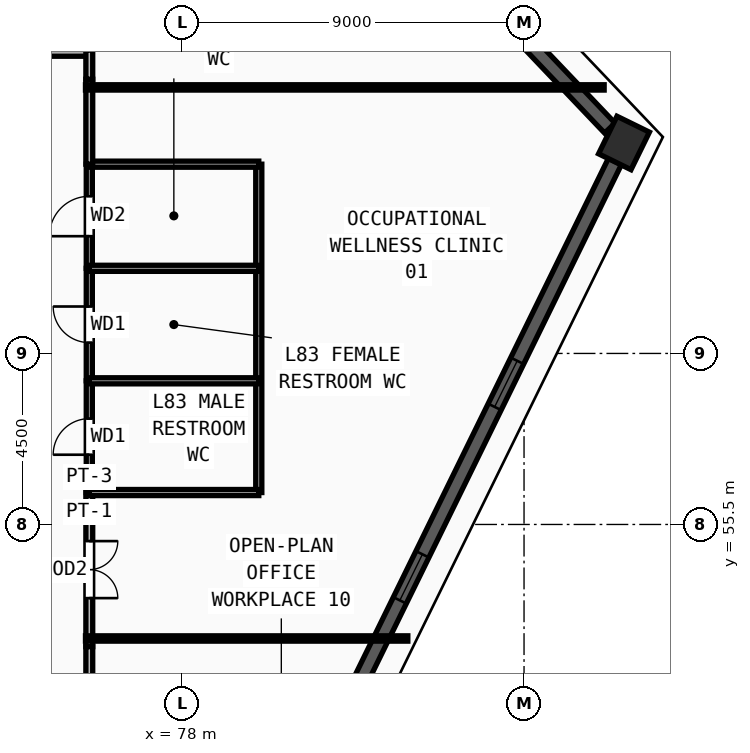
"""IFC4 building model, lengths in metres.
Left out: names, types, materials, properties, quantities, classifications, styles, units other than length and angle.
Written with IfcOpenShell. Run it as: python <this file> out.ifc"""

import sys

from ifc_helpers import new_model, si_unit, direction, frame, frame_2d, origin, origin_2d, place, context, subcontext, project, spatial, rectangle, extrude, source, transform, mapped, element, fill, save


model = new_model("IFC4")
c1 = context("Model", 3, precision=1e-05, world=origin(), true_north=direction((0.0, 1.0)))
c2 = subcontext(c1, "Body", "Model", "MODEL_VIEW")
j1 = project(units=[si_unit("LENGTHUNIT", "METRE"), si_unit("PLANEANGLEUNIT", "RADIAN")], contexts=[c1])
p1 = place(None, origin())
s1 = spatial("IfcSite", under=j1, at=p1, CompositionType="ELEMENT")
p2 = place(p1, origin())
s2 = spatial("IfcBuilding", under=s1, at=p2, CompositionType="ELEMENT")
p3 = place(p2, frame((0.0, 0.0, 320.25)))
s3 = spatial("IfcBuildingStorey", under=s2, at=p3, CompositionType="ELEMENT", Elevation=320.25)
m1 = source(origin(), c2, "Body", "SweptSolid", [
    extrude(rectangle(XDim=1.1, YDim=0.95, at=origin_2d()), origin(), (0.0, 0.0, 1.0), 3.75),
])
p4 = place(p3, frame((89.63, 65.538, 0.0), z_axis=(0.0, 0.0, 1.0), x_axis=(0.440095898534, 0.897950778213, 0.0)))
e1 = element("IfcColumn", 1, at=p4, inside=s3, PredefinedType="COLUMN", context=c2, shape_type="MappedRepresentation", body=[
    mapped(m1, transform((0.0, 0.0, 0.0), x_axis=(1.0, 0.0, 0.0), y_axis=(0.0, 1.0, 0.0), z_axis=(0.0, 0.0, 1.0), scale=1.0)),
])
p5 = place(p3, frame((77.918, 41.639, 0.0), z_axis=(0.0, 0.0, 1.0), x_axis=(0.440053301327, 0.897971654336, 0.0)))
e2 = element("IfcWall", 2, at=p5, inside=s3, PredefinedType="SOLIDWALL", context=c2, shape_type="SweptSolid", body=[
    extrude(rectangle(XDim=26.074, YDim=0.38, at=frame_2d((13.037, 0.0))), origin(), (0.0, 0.0, 1.0), 3.47),
])
m2 = source(origin(), c2, "Body", "SweptSolid", [
    extrude(rectangle(XDim=1.35, YDim=1.85, at=frame_2d((0.675, 0.925))), frame((0.0, 0.2, 0.0), z_axis=(0.0, -1.0, 0.0), x_axis=(1.0, 0.0, 0.0)), (0.0, 0.0, 1.0), 0.4),
])
p6 = place(p5, frame((13.212, 0.0, 0.55)))
e3 = element("IfcOpeningElement", 3, at=p6, cuts=e2, PredefinedType="OPENING", context=c2, shape_type="MappedRepresentation", body=[
    mapped(m2, transform((0.0, 0.0, 0.0), x_axis=(1.0, 0.0, 0.0), y_axis=(0.0, 1.0, 0.0), z_axis=(0.0, 0.0, 1.0), scale=1.0)),
])
p7 = place(p5, frame((18.881, 0.0, 0.55)))
e4 = element("IfcOpeningElement", 4, at=p7, cuts=e2, PredefinedType="OPENING", context=c2, shape_type="MappedRepresentation", body=[
    mapped(m2, transform((0.0, 0.0, 0.0), x_axis=(1.0, 0.0, 0.0), y_axis=(0.0, 1.0, 0.0), z_axis=(0.0, 0.0, 1.0), scale=1.0)),
])
p8 = place(p3, frame((89.258, 65.929, 0.0), z_axis=(0.0, 0.0, 1.0), x_axis=(-0.689374007366, 0.724405603215, 0.0)))
e5 = element("IfcWall", 5, at=p8, inside=s3, PredefinedType="SOLIDWALL", context=c2, shape_type="SweptSolid", body=[
    extrude(rectangle(XDim=3.882, YDim=0.38, at=frame_2d((1.941, 0.0))), origin(), (0.0, 0.0, 1.0), 3.47),
])
p9 = place(p3, frame((75.56, 56.34, 0.0), z_axis=(0.0, 0.0, 1.0), x_axis=(0.0, 1.0, 0.0)))
e6 = element("IfcWall", 6, at=p9, inside=s3, PredefinedType="PARTITIONING", context=c2, shape_type="SweptSolid", body=[
    extrude(rectangle(XDim=2.94, YDim=0.16, at=frame_2d((1.47, 0.0))), origin(), (0.0, 0.0, 1.0), 3.47),
])
m3 = source(origin(), c2, "Body", "SweptSolid", [
    extrude(rectangle(XDim=0.95, YDim=2.15, at=frame_2d((0.475, 1.075))), frame((0.0, 0.09, 0.0), z_axis=(0.0, -1.0, 0.0), x_axis=(1.0, 0.0, 0.0)), (0.0, 0.0, 1.0), 0.18),
])
p10 = place(p9, frame((0.995, 0.0, 0.0)))
e7 = element("IfcOpeningElement", 7, at=p10, cuts=e6, PredefinedType="OPENING", context=c2, shape_type="MappedRepresentation", body=[
    mapped(m3, transform((0.0, 0.0, 0.0), x_axis=(1.0, 0.0, 0.0), y_axis=(0.0, 1.0, 0.0), z_axis=(0.0, 0.0, 1.0), scale=1.0)),
])
p11 = place(p3, frame((75.56, 59.28, 0.0), z_axis=(0.0, 0.0, 1.0), x_axis=(0.0, 1.0, 0.0)))
e8 = element("IfcWall", 8, at=p11, inside=s3, PredefinedType="PARTITIONING", context=c2, shape_type="SweptSolid", body=[
    extrude(rectangle(XDim=2.96, YDim=0.16, at=frame_2d((1.48, 0.0))), origin(), (0.0, 0.0, 1.0), 3.47),
])
p12 = place(p11, frame((1.005, 0.0, 0.0)))
e9 = element("IfcOpeningElement", 9, at=p12, cuts=e8, PredefinedType="OPENING", context=c2, shape_type="MappedRepresentation", body=[
    mapped(m3, transform((0.0, 0.0, 0.0), x_axis=(1.0, 0.0, 0.0), y_axis=(0.0, 1.0, 0.0), z_axis=(0.0, 0.0, 1.0), scale=1.0)),
])
p13 = place(p3, frame((75.56, 62.24, 0.0), z_axis=(0.0, 0.0, 1.0), x_axis=(0.0, 1.0, 0.0)))
e10 = element("IfcWall", 10, at=p13, inside=s3, PredefinedType="PARTITIONING", context=c2, shape_type="SweptSolid", body=[
    extrude(rectangle(XDim=2.74, YDim=0.16, at=frame_2d((1.37, 0.0))), origin(), (0.0, 0.0, 1.0), 3.47),
])
m4 = source(origin(), c2, "Body", "SweptSolid", [
    extrude(rectangle(XDim=1.05, YDim=2.15, at=frame_2d((0.525, 1.075))), frame((0.0, 0.09, 0.0), z_axis=(0.0, -1.0, 0.0), x_axis=(1.0, 0.0, 0.0)), (0.0, 0.0, 1.0), 0.18),
])
p14 = place(p13, frame((0.845, 0.0, 0.0)))
e11 = element("IfcOpeningElement", 11, at=p14, cuts=e10, PredefinedType="OPENING", context=c2, shape_type="MappedRepresentation", body=[
    mapped(m4, transform((0.0, 0.0, 0.0), x_axis=(1.0, 0.0, 0.0), y_axis=(0.0, 1.0, 0.0), z_axis=(0.0, 0.0, 1.0), scale=1.0)),
])
p15 = place(p3, frame((75.56, 56.34, 0.0), z_axis=(0.0, 0.0, 1.0), x_axis=(0.0, -1.0, 0.0)))
e12 = element("IfcWall", 12, at=p15, inside=s3, PredefinedType="PARTITIONING", context=c2, shape_type="SweptSolid", body=[
    extrude(rectangle(XDim=4.055, YDim=0.18, at=frame_2d((2.028, 0.0))), origin(), (0.0, 0.0, 1.0), 3.47),
])
m5 = source(origin(), c2, "Body", "SweptSolid", [
    extrude(rectangle(XDim=1.5, YDim=2.2, at=frame_2d((0.75, 1.1))), frame((0.0, 0.1, 0.0), z_axis=(0.0, -1.0, 0.0), x_axis=(1.0, 0.0, 0.0)), (0.0, 0.0, 1.0), 0.2),
])
p16 = place(p15, frame((1.278, 0.0, 0.0)))
e13 = element("IfcOpeningElement", 13, at=p16, cuts=e12, PredefinedType="OPENING", context=c2, shape_type="MappedRepresentation", body=[
    mapped(m5, transform((0.0, 0.0, 0.0), x_axis=(1.0, 0.0, 0.0), y_axis=(0.0, 1.0, 0.0), z_axis=(0.0, 0.0, 1.0), scale=1.0)),
])
p17 = place(p3, frame((63.785, 67.91, 0.0), z_axis=(0.0, 0.0, 1.0), x_axis=(1.0, 0.0, 0.0)))
e14 = element("IfcWall", 14, at=p17, inside=s3, PredefinedType="PARTITIONING", context=c2, shape_type="SweptSolid", body=[
    extrude(rectangle(XDim=11.845, YDim=0.18, at=frame_2d((5.922, 0.0))), origin(), (0.0, 0.0, 1.0), 3.47),
])
p18 = place(p17, frame((5.172, 0.0, 0.0)))
e15 = element("IfcOpeningElement", 15, at=p18, cuts=e14, PredefinedType="OPENING", context=c2, shape_type="MappedRepresentation", body=[
    mapped(m5, transform((0.0, 0.0, 0.0), x_axis=(1.0, 0.0, 0.0), y_axis=(0.0, 1.0, 0.0), z_axis=(0.0, 0.0, 1.0), scale=1.0)),
])
p19 = place(p3, frame((80.02, 56.34, 0.0), z_axis=(0.0, 0.0, 1.0), x_axis=(0.0, 1.0, 0.0)))
e16 = element("IfcWall", 16, at=p19, inside=s3, PredefinedType="PARTITIONING", context=c2, shape_type="SweptSolid", body=[
    extrude(rectangle(XDim=8.64, YDim=0.16, at=frame_2d((4.32, 0.0))), origin(), (0.0, 0.0, 1.0), 3.47),
])
for number, where, z_axis, x_axis in (
    (17, (75.56, 56.34, 0.0), (0.0, 0.0, 1.0), (1.0, 0.0, 0.0)),
    (18, (75.56, 59.28, 0.0), (0.0, 0.0, 1.0), (1.0, 0.0, 0.0)),
    (19, (75.56, 62.24, 0.0), (0.0, 0.0, 1.0), (1.0, 0.0, 0.0)),
    (20, (75.56, 64.98, 0.0), (0.0, 0.0, 1.0), (1.0, 0.0, 0.0)),
):
    element("IfcWall", number, at=place(p3, frame(where, z_axis=z_axis, x_axis=x_axis)), inside=s3, PredefinedType="PARTITIONING", context=c2, shape_type="SweptSolid", body=[
        extrude(rectangle(XDim=4.46, YDim=0.16, at=frame_2d((2.23, 0.0))), origin(), (0.0, 0.0, 1.0), 3.47),
    ])
p20 = place(p3, frame((75.56, 67.215, 0.0), z_axis=(0.0, 0.0, 1.0), x_axis=(0.0, -1.0, 0.0)))
e21 = element("IfcWall", 21, at=p20, inside=s3, PredefinedType="PARTITIONING", context=c2, shape_type="SweptSolid", body=[
    extrude(rectangle(XDim=2.235, YDim=0.18, at=frame_2d((1.118, 0.0))), origin(), (0.0, 0.0, 1.0), 3.47),
])
p21 = place(p3, frame((75.56, 67.98, 0.0), z_axis=(0.0, 0.0, 1.0), x_axis=(0.0, -1.0, 0.0)))
e22 = element("IfcWall", 22, at=p21, inside=s3, PredefinedType="PARTITIONING", context=c2, shape_type="SweptSolid", body=[
    extrude(rectangle(XDim=0.765, YDim=0.18, at=frame_2d((0.382, 0.0))), origin(), (0.0, 0.0, 1.0), 3.47),
])
p22 = place(p3, frame((75.56, 52.285, 0.0), z_axis=(0.0, 0.0, 1.0), x_axis=(0.0, -1.0, 0.0)))
e23 = element("IfcWall", 23, at=p22, inside=s3, PredefinedType="PARTITIONING", context=c2, shape_type="SweptSolid", body=[
    extrude(rectangle(XDim=1.895, YDim=0.18, at=frame_2d((0.948, 0.0))), origin(), (0.0, 0.0, 1.0), 3.47),
])
p23 = place(p3, frame((75.46, 52.5, 0.0), z_axis=(0.0, 0.0, 1.0), x_axis=(1.0, 0.0, 0.0)))
e24 = element("IfcWall", 24, at=p23, inside=s3, PredefinedType="PARTITIONING", context=c2, shape_type="SweptSolid", body=[
    extrude(rectangle(XDim=8.482, YDim=0.14, at=frame_2d((4.241, 0.0))), origin(), (0.0, 0.0, 1.0), 3.47),
])
p24 = place(p3, frame((75.46, 67.0, 0.0), z_axis=(0.0, 0.0, 1.0), x_axis=(1.0, 0.0, 0.0)))
e25 = element("IfcWall", 25, at=p24, inside=s3, PredefinedType="PARTITIONING", context=c2, shape_type="SweptSolid", body=[
    extrude(rectangle(XDim=13.648, YDim=0.14, at=frame_2d((6.824, 0.0))), origin(), (0.0, 0.0, 1.0), 3.161),
])
m6 = source(origin(), c2, "Body", "SweptSolid", [
    extrude(rectangle(XDim=1.35, YDim=1.85, at=frame_2d((0.675, 0.925))), frame((0.0, 0.03, 0.0), z_axis=(0.0, -1.0, 0.0), x_axis=(1.0, 0.0, 0.0)), (0.0, 0.0, 1.0), 0.06),
])
p25 = place(p6, origin())
e26 = element("IfcWindow", 26, at=p25, inside=s3, PartitioningType="SINGLE_PANEL", PredefinedType="WINDOW", context=c2, shape_type="MappedRepresentation", body=[
    mapped(m6, transform((0.0, 0.0, 0.0), x_axis=(1.0, 0.0, 0.0), y_axis=(0.0, 1.0, 0.0), z_axis=(0.0, 0.0, 1.0), scale=1.0)),
])
fill(e3, e26)
p26 = place(p7, origin())
e27 = element("IfcWindow", 27, at=p26, inside=s3, PartitioningType="SINGLE_PANEL", PredefinedType="WINDOW", context=c2, shape_type="MappedRepresentation", body=[
    mapped(m6, transform((0.0, 0.0, 0.0), x_axis=(1.0, 0.0, 0.0), y_axis=(0.0, 1.0, 0.0), z_axis=(0.0, 0.0, 1.0), scale=1.0)),
])
fill(e4, e27)
m7 = source(origin(), c2, "Body", "SweptSolid", [
    extrude(rectangle(XDim=0.95, YDim=2.15, at=frame_2d((0.475, 1.075))), frame((0.0, 0.025, 0.0), z_axis=(0.0, -1.0, 0.0), x_axis=(1.0, 0.0, 0.0)), (0.0, 0.0, 1.0), 0.05),
])
p27 = place(p10, origin())
e28 = element("IfcDoor", 28, at=p27, inside=s3, OperationType="SINGLE_SWING_LEFT", PredefinedType="DOOR", context=c2, shape_type="MappedRepresentation", body=[
    mapped(m7, transform((0.0, 0.0, 0.0), x_axis=(1.0, 0.0, 0.0), y_axis=(0.0, 1.0, 0.0), z_axis=(0.0, 0.0, 1.0), scale=1.0)),
])
fill(e7, e28)
p28 = place(p12, origin())
e29 = element("IfcDoor", 29, at=p28, inside=s3, OperationType="SINGLE_SWING_RIGHT", PredefinedType="DOOR", context=c2, shape_type="MappedRepresentation", body=[
    mapped(m7, transform((0.0, 0.0, 0.0), x_axis=(1.0, 0.0, 0.0), y_axis=(0.0, 1.0, 0.0), z_axis=(0.0, 0.0, 1.0), scale=1.0)),
])
fill(e9, e29)
m8 = source(origin(), c2, "Body", "SweptSolid", [
    extrude(rectangle(XDim=1.05, YDim=2.15, at=frame_2d((0.525, 1.075))), frame((0.0, 0.025, 0.0), z_axis=(0.0, -1.0, 0.0), x_axis=(1.0, 0.0, 0.0)), (0.0, 0.0, 1.0), 0.05),
])
p29 = place(p14, origin())
e30 = element("IfcDoor", 30, at=p29, inside=s3, OperationType="SINGLE_SWING_LEFT", PredefinedType="DOOR", context=c2, shape_type="MappedRepresentation", body=[
    mapped(m8, transform((0.0, 0.0, 0.0), x_axis=(1.0, 0.0, 0.0), y_axis=(0.0, 1.0, 0.0), z_axis=(0.0, 0.0, 1.0), scale=1.0)),
])
fill(e11, e30)
m9 = source(origin(), c2, "Body", "SweptSolid", [
    extrude(rectangle(XDim=1.5, YDim=2.2, at=frame_2d((0.75, 1.1))), frame((0.0, 0.025, 0.0), z_axis=(0.0, -1.0, 0.0), x_axis=(1.0, 0.0, 0.0)), (0.0, 0.0, 1.0), 0.05),
])
p30 = place(p16, origin())
e31 = element("IfcDoor", 31, at=p30, inside=s3, OperationType="DOUBLE_DOOR_SINGLE_SWING", PredefinedType="DOOR", context=c2, shape_type="MappedRepresentation", body=[
    mapped(m9, transform((0.0, 0.0, 0.0), x_axis=(1.0, 0.0, 0.0), y_axis=(0.0, 1.0, 0.0), z_axis=(0.0, 0.0, 1.0), scale=1.0)),
])
fill(e13, e31)
save(model, sys.argv[1])
